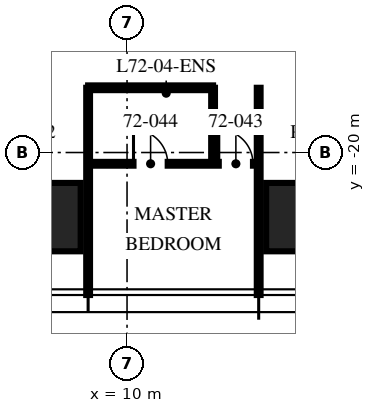
"""IFC4 building model, lengths in metres.
Left out: names, types, materials, properties, quantities, classifications, styles, units other than length and angle.
Written with IfcOpenShell. Run it as: python <this file> out.ifc"""

import sys

from ifc_helpers import new_model, si_unit, direction, frame, frame_2d, origin, origin_2d, place, context, subcontext, project, spatial, rectangle, extrude, element, fill, save


model = new_model("IFC4")
c1 = context("Model", 3, precision=1e-05, world=origin(), true_north=direction((0.0, 1.0)))
c2 = subcontext(c1, "Body", "Model", "MODEL_VIEW")
j1 = project(units=[si_unit("LENGTHUNIT", "METRE"), si_unit("PLANEANGLEUNIT", "RADIAN")], contexts=[c1])
p1 = place(None, origin())
s1 = spatial("IfcSite", under=j1, at=p1, CompositionType="ELEMENT")
p2 = place(p1, origin())
s2 = spatial("IfcBuilding", under=s1, at=p2, CompositionType="ELEMENT")
p3 = place(p2, frame((0.0, 0.0, 289.5)))
s3 = spatial("IfcBuildingStorey", under=s2, at=p3, CompositionType="ELEMENT", Elevation=289.5)
for number, where, z_axis, x_axis in (
    (1, (14.96, -21.7, 0.0), (0.0, 0.0, 1.0), (1.0, 0.0, 0.0)),
    (2, (7.48, -21.7, 0.0), (0.0, 0.0, 1.0), (1.0, 0.0, 0.0)),
):
    element("IfcColumn", number, at=place(p3, frame(where, z_axis=z_axis, x_axis=x_axis)), inside=s3, PredefinedType="COLUMN", context=c2, shape_type="SweptSolid", body=[
        extrude(rectangle(XDim=2.6, YDim=1.8, at=origin_2d()), origin(), (0.0, 0.0, 1.0), 3.75),
    ])
for number, where, z_axis, x_axis in (
    (3, (8.976, -18.296, 0.0), (0.0, 0.0, 1.0), (0.0, -1.0, 0.0)),
    (4, (13.464, -18.296, 0.0), (0.0, 0.0, 1.0), (0.0, -1.0, 0.0)),
):
    element("IfcWall", number, at=place(p3, frame(where, z_axis=z_axis, x_axis=x_axis)), inside=s3, PredefinedType="PARTITIONING", context=c2, shape_type="SweptSolid", body=[
        extrude(rectangle(XDim=5.454, YDim=0.1, at=frame_2d((2.727, 0.0))), origin(), (0.0, 0.0, 1.0), 3.01),
    ])
p4 = place(p3, frame((8.976, -20.296, 0.0), z_axis=(0.0, 0.0, 1.0), x_axis=(1.0, 0.0, 0.0)))
e5 = element("IfcWall", 5, at=p4, inside=s3, PredefinedType="PARTITIONING", context=c2, shape_type="SweptSolid", body=[
    extrude(rectangle(XDim=4.488, YDim=0.1, at=frame_2d((2.244, 0.0))), origin(), (0.0, 0.0, 1.0), 2.91),
])
p5 = place(p4, frame((3.438, 0.0, 0.0)))
e6 = element("IfcOpeningElement", 6, at=p5, cuts=e5, PredefinedType="OPENING", context=c2, shape_type="SweptSolid", body=[
    extrude(rectangle(XDim=0.9, YDim=2.1, at=frame_2d((0.45, 1.05))), frame((0.0, 0.06, 0.0), z_axis=(0.0, -1.0, 0.0), x_axis=(1.0, 0.0, 0.0)), (0.0, 0.0, 1.0), 0.12),
])
p6 = place(p4, frame((1.194, 0.0, 0.0)))
e7 = element("IfcOpeningElement", 7, at=p6, cuts=e5, PredefinedType="OPENING", context=c2, shape_type="SweptSolid", body=[
    extrude(rectangle(XDim=0.9, YDim=2.1, at=frame_2d((0.45, 1.05))), frame((0.0, 0.06, 0.0), z_axis=(0.0, -1.0, 0.0), x_axis=(1.0, 0.0, 0.0)), (0.0, 0.0, 1.0), 0.12),
])
p7 = place(p3, frame((12.264, -18.296, 0.0), z_axis=(0.0, 0.0, 1.0), x_axis=(0.0, -1.0, 0.0)))
e8 = element("IfcWall", 8, at=p7, inside=s3, PredefinedType="PARTITIONING", context=c2, shape_type="SweptSolid", body=[
    extrude(rectangle(XDim=2.0, YDim=0.1, at=frame_2d((1.0, 0.0))), origin(), (0.0, 0.0, 1.0), 3.5),
])
p8 = place(p3, frame((8.976, -18.296, 0.0), z_axis=(0.0, 0.0, 1.0), x_axis=(1.0, 0.0, 0.0)))
e9 = element("IfcWall", 9, at=p8, inside=s3, PredefinedType="PARTITIONING", context=c2, shape_type="SweptSolid", body=[
    extrude(rectangle(XDim=3.288, YDim=0.125, at=frame_2d((1.644, 0.0))), origin(), (0.0, 0.0, 1.0), 2.91),
])
p9 = place(p5, origin())
e10 = element("IfcDoor", 10, at=p9, inside=s3, OperationType="SINGLE_SWING_LEFT", PredefinedType="DOOR", context=c2, shape_type="SweptSolid", body=[
    extrude(rectangle(XDim=0.9, YDim=2.1, at=frame_2d((0.45, 1.05))), frame((0.0, 0.025, 0.0), z_axis=(0.0, -1.0, 0.0), x_axis=(1.0, 0.0, 0.0)), (0.0, 0.0, 1.0), 0.05),
])
fill(e6, e10)
p10 = place(p6, origin())
e11 = element("IfcDoor", 11, at=p10, inside=s3, OperationType="SINGLE_SWING_LEFT", PredefinedType="DOOR", context=c2, shape_type="SweptSolid", body=[
    extrude(rectangle(XDim=0.9, YDim=2.1, at=frame_2d((0.45, 1.05))), frame((0.0, 0.025, 0.0), z_axis=(0.0, -1.0, 0.0), x_axis=(1.0, 0.0, 0.0)), (0.0, 0.0, 1.0), 0.05),
])
fill(e7, e11)
save(model, sys.argv[1])
